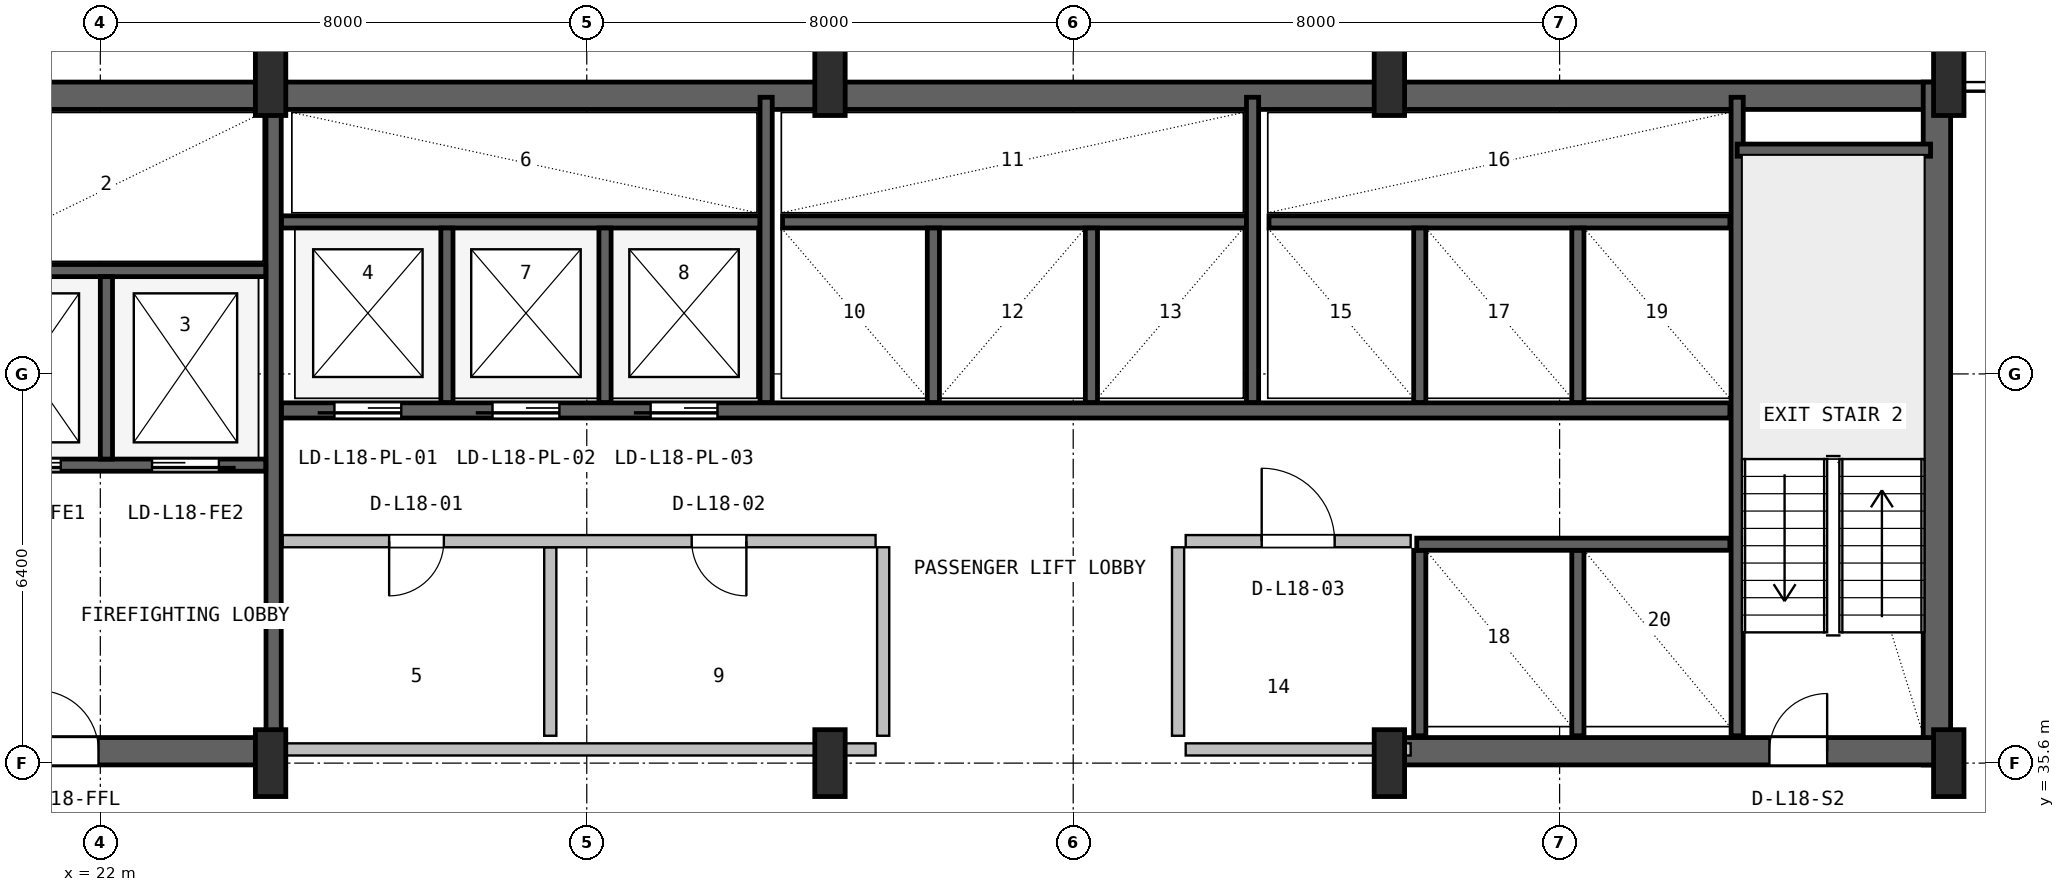
"""IFC4 building model, lengths in metres.
Left out: names, types, materials, properties, quantities, classifications, styles, units other than length and angle.
Written with IfcOpenShell. Run it as: python <this file> out.ifc"""

import sys

from ifc_helpers import new_model, si_unit, direction, frame, frame_2d, origin, origin_2d, place, context, subcontext, project, spatial, rectangle, i_section, extrude, source, transform, mapped, element, fill, save


model = new_model("IFC4")
c1 = context("Model", 3, precision=1e-05, world=origin(), true_north=direction((0.0, 1.0)))
c2 = subcontext(c1, "Body", "Model", "MODEL_VIEW")
j1 = project(units=[si_unit("LENGTHUNIT", "METRE"), si_unit("PLANEANGLEUNIT", "RADIAN")], contexts=[c1])
p1 = place(None, origin())
s1 = spatial("IfcSite", under=j1, at=p1, CompositionType="ELEMENT")
p2 = place(p1, origin())
s2 = spatial("IfcBuilding", under=s1, at=p2, CompositionType="ELEMENT")
p3 = place(p2, frame((0.0, 0.0, 78.3)))
s3 = spatial("IfcBuildingStorey", under=s2, at=p3, CompositionType="ELEMENT", Elevation=78.3)
p4 = place(p3, frame((15.6, 46.575, 0.0), z_axis=(0.0, 0.0, 1.0), x_axis=(1.0, 0.0, 0.0)))
e1 = element("IfcWall", 1, at=p4, inside=s3, PredefinedType="SHEAR", context=c2, shape_type="SweptSolid", body=[
    extrude(rectangle(XDim=36.8, YDim=0.45, at=frame_2d((18.4, 0.0))), origin(), (0.0, 0.0, 1.0), 3.58),
])
p5 = place(p3, frame((52.205, 35.57, 0.0), z_axis=(0.0, 0.0, 1.0), x_axis=(0.0, 1.0, 0.0)))
e2 = element("IfcWall", 2, at=p5, inside=s3, PredefinedType="SHEAR", context=c2, shape_type="SweptSolid", body=[
    extrude(rectangle(XDim=11.23, YDim=0.45, at=frame_2d((5.615, 0.0))), origin(), (0.0, 0.0, 1.0), 3.58),
])
p6 = place(p3, frame((15.57, 35.795, 0.0), z_axis=(0.0, 0.0, 1.0), x_axis=(1.0, 0.0, 0.0)))
e3 = element("IfcWall", 3, at=p6, inside=s3, PredefinedType="SHEAR", context=c2, shape_type="SweptSolid", body=[
    extrude(rectangle(XDim=9.23, YDim=0.45, at=frame_2d((4.615, 0.0))), origin(), (0.0, 0.0, 1.0), 3.58),
])
p7 = place(p6, frame((5.4, 0.0, 0.0)))
e4 = element("IfcOpeningElement", 4, at=p7, cuts=e3, PredefinedType="OPENING", context=c2, shape_type="SweptSolid", body=[
    extrude(rectangle(XDim=1.0, YDim=2.1, at=frame_2d((0.5, 1.05))), frame((0.0, 0.235, 0.0), z_axis=(0.0, -1.0, 0.0), x_axis=(1.0, 0.0, 0.0)), (0.0, 0.0, 1.0), 0.47),
])
p8 = place(p3, frame((43.2, 35.795, 0.0), z_axis=(0.0, 0.0, 1.0), x_axis=(1.0, 0.0, 0.0)))
e5 = element("IfcWall", 5, at=p8, inside=s3, PredefinedType="SHEAR", context=c2, shape_type="SweptSolid", body=[
    extrude(rectangle(XDim=9.23, YDim=0.45, at=frame_2d((4.615, 0.0))), origin(), (0.0, 0.0, 1.0), 3.58),
])
p9 = place(p8, frame((6.25, 0.0, 0.0)))
e6 = element("IfcOpeningElement", 6, at=p9, cuts=e5, PredefinedType="OPENING", context=c2, shape_type="SweptSolid", body=[
    extrude(rectangle(XDim=0.95, YDim=2.1, at=frame_2d((0.475, 1.05))), frame((0.0, 0.235, 0.0), z_axis=(0.0, -1.0, 0.0), x_axis=(1.0, 0.0, 0.0)), (0.0, 0.0, 1.0), 0.47),
])
m1 = source(origin(), c2, "Body", "SweptSolid", [
    extrude(i_section(OverallWidth=0.5, OverallDepth=1.1, WebThickness=0.018, FlangeThickness=0.032, FilletRadius=0.018, at=origin_2d()), origin(), (0.0, 0.0, 1.0), 3.9),
])
for number, where, z_axis, x_axis in (
    (7, (24.8, 35.6, 0.0), (0.0, 0.0, 1.0), (1.0, 0.0, 0.0)),
    (8, (24.8, 46.8, 0.0), (0.0, 0.0, 1.0), (1.0, 0.0, 0.0)),
    (9, (34.0, 35.6, 0.0), (0.0, 0.0, 1.0), (1.0, 0.0, 0.0)),
    (10, (34.0, 46.8, 0.0), (0.0, 0.0, 1.0), (1.0, 0.0, 0.0)),
    (11, (43.2, 35.6, 0.0), (0.0, 0.0, 1.0), (1.0, 0.0, 0.0)),
    (12, (43.2, 46.8, 0.0), (0.0, 0.0, 1.0), (1.0, 0.0, 0.0)),
    (13, (52.4, 35.6, 0.0), (0.0, 0.0, 1.0), (1.0, 0.0, 0.0)),
    (14, (52.4, 46.8, 0.0), (0.0, 0.0, 1.0), (1.0, 0.0, 0.0)),
):
    element("IfcColumn", number, at=place(p3, frame(where, z_axis=z_axis, x_axis=x_axis)), inside=s3, PredefinedType="COLUMN", context=c2, shape_type="MappedRepresentation", body=[
        mapped(m1, transform((0.0, 0.0, 0.0), x_axis=(1.0, 0.0, 0.0), y_axis=(0.0, 1.0, 0.0), z_axis=(0.0, 0.0, 1.0), scale=1.0)),
    ])
p10 = place(p3, frame((24.85, 36.05, 0.0), z_axis=(0.0, 0.0, 1.0), x_axis=(0.0, 1.0, 0.0)))
e15 = element("IfcWall", 15, at=p10, inside=s3, PredefinedType="SHEAR", context=c2, shape_type="SweptSolid", body=[
    extrude(rectangle(XDim=10.45, YDim=0.25, at=frame_2d((5.225, 0.0))), origin(), (0.0, 0.0, 1.0), 3.58),
])
p11 = place(p3, frame((19.2, 40.5, 0.0), z_axis=(0.0, 0.0, 1.0), x_axis=(1.0, 0.0, 0.0)))
e16 = element("IfcWall", 16, at=p11, inside=s3, PredefinedType="SHEAR", context=c2, shape_type="SweptSolid", body=[
    extrude(rectangle(XDim=5.52, YDim=0.2, at=frame_2d((2.76, 0.0))), origin(), (0.0, 0.0, 1.0), 3.58),
])
p12 = place(p11, frame((1.05, 0.0, 0.0)))
e17 = element("IfcOpeningElement", 17, at=p12, cuts=e16, PredefinedType="OPENING", context=c2, shape_type="SweptSolid", body=[
    extrude(rectangle(XDim=1.1, YDim=2.18, at=frame_2d((0.55, 1.09))), frame((0.0, 0.11, 0.0), z_axis=(0.0, -1.0, 0.0), x_axis=(1.0, 0.0, 0.0)), (0.0, 0.0, 1.0), 0.22),
])
p13 = place(p11, frame((3.65, 0.0, 0.0)))
e18 = element("IfcOpeningElement", 18, at=p13, cuts=e16, PredefinedType="OPENING", context=c2, shape_type="SweptSolid", body=[
    extrude(rectangle(XDim=1.1, YDim=2.18, at=frame_2d((0.55, 1.09))), frame((0.0, 0.11, 0.0), z_axis=(0.0, -1.0, 0.0), x_axis=(1.0, 0.0, 0.0)), (0.0, 0.0, 1.0), 0.22),
])
p14 = place(p3, frame((19.2, 43.7, 0.0), z_axis=(0.0, 0.0, 1.0), x_axis=(1.0, 0.0, 0.0)))
e19 = element("IfcWall", 19, at=p14, inside=s3, PredefinedType="SHEAR", context=c2, shape_type="SweptSolid", body=[
    extrude(rectangle(XDim=5.52, YDim=0.2, at=frame_2d((2.76, 0.0))), origin(), (0.0, 0.0, 1.0), 3.58),
])
p15 = place(p3, frame((22.1, 40.6, 0.0), z_axis=(0.0, 0.0, 1.0), x_axis=(0.0, 1.0, 0.0)))
e20 = element("IfcWall", 20, at=p15, inside=s3, PredefinedType="SHEAR", context=c2, shape_type="SweptSolid", body=[
    extrude(rectangle(XDim=3.0, YDim=0.2, at=frame_2d((1.5, 0.0))), origin(), (0.0, 0.0, 1.0), 3.58),
])
p16 = place(p3, frame((48.92, 36.05, 0.0), z_axis=(0.0, 0.0, 1.0), x_axis=(0.0, 1.0, 0.0)))
e21 = element("IfcWall", 21, at=p16, inside=s3, PredefinedType="SHEAR", context=c2, shape_type="SweptSolid", body=[
    extrude(rectangle(XDim=10.5, YDim=0.2, at=frame_2d((5.25, 0.0))), origin(), (0.0, 0.0, 1.0), 3.58),
])
p17 = place(p3, frame((48.92, 45.68, 0.0), z_axis=(0.0, 0.0, 1.0), x_axis=(1.0, 0.0, 0.0)))
e22 = element("IfcWall", 22, at=p17, inside=s3, PredefinedType="SHEAR", context=c2, shape_type="SweptSolid", body=[
    extrude(rectangle(XDim=3.18, YDim=0.2, at=frame_2d((1.59, 0.0))), origin(), (0.0, 0.0, 1.0), 3.58),
])
p18 = place(p3, frame((24.98, 41.4, 0.0), z_axis=(0.0, 0.0, 1.0), x_axis=(1.0, 0.0, 0.0)))
e23 = element("IfcWall", 23, at=p18, inside=s3, PredefinedType="SHEAR", context=c2, shape_type="SweptSolid", body=[
    extrude(rectangle(XDim=23.82, YDim=0.25, at=frame_2d((11.91, 0.0))), origin(), (0.0, 0.0, 1.0), 3.58),
])
p19 = place(p18, frame((0.87, 0.0, 0.0)))
e24 = element("IfcOpeningElement", 24, at=p19, cuts=e23, PredefinedType="OPENING", context=c2, shape_type="SweptSolid", body=[
    extrude(rectangle(XDim=1.1, YDim=2.18, at=frame_2d((0.55, 1.09))), frame((0.0, 0.135, 0.0), z_axis=(0.0, -1.0, 0.0), x_axis=(1.0, 0.0, 0.0)), (0.0, 0.0, 1.0), 0.27),
])
p20 = place(p18, frame((3.47, 0.0, 0.0)))
e25 = element("IfcOpeningElement", 25, at=p20, cuts=e23, PredefinedType="OPENING", context=c2, shape_type="SweptSolid", body=[
    extrude(rectangle(XDim=1.1, YDim=2.18, at=frame_2d((0.55, 1.09))), frame((0.0, 0.135, 0.0), z_axis=(0.0, -1.0, 0.0), x_axis=(1.0, 0.0, 0.0)), (0.0, 0.0, 1.0), 0.27),
])
p21 = place(p18, frame((6.07, 0.0, 0.0)))
e26 = element("IfcOpeningElement", 26, at=p21, cuts=e23, PredefinedType="OPENING", context=c2, shape_type="SweptSolid", body=[
    extrude(rectangle(XDim=1.1, YDim=2.18, at=frame_2d((0.55, 1.09))), frame((0.0, 0.135, 0.0), z_axis=(0.0, -1.0, 0.0), x_axis=(1.0, 0.0, 0.0)), (0.0, 0.0, 1.0), 0.27),
])
p22 = place(p3, frame((24.98, 44.5, 0.0), z_axis=(0.0, 0.0, 1.0), x_axis=(1.0, 0.0, 0.0)))
e27 = element("IfcWall", 27, at=p22, inside=s3, PredefinedType="SHEAR", context=c2, shape_type="SweptSolid", body=[
    extrude(rectangle(XDim=7.87, YDim=0.2, at=frame_2d((3.935, 0.0))), origin(), (0.0, 0.0, 1.0), 3.58),
])
for number, where, z_axis, x_axis in (
    (28, (27.7, 41.53, 0.0), (0.0, 0.0, 1.0), (0.0, 1.0, 0.0)),
    (29, (30.3, 41.53, 0.0), (0.0, 0.0, 1.0), (0.0, 1.0, 0.0)),
):
    element("IfcWall", number, at=place(p3, frame(where, z_axis=z_axis, x_axis=x_axis)), inside=s3, PredefinedType="SHEAR", context=c2, shape_type="SweptSolid", body=[
        extrude(rectangle(XDim=2.87, YDim=0.2, at=frame_2d((1.435, 0.0))), origin(), (0.0, 0.0, 1.0), 3.58),
    ])
p23 = place(p3, frame((32.95, 41.53, 0.0), z_axis=(0.0, 0.0, 1.0), x_axis=(0.0, 1.0, 0.0)))
e30 = element("IfcWall", 30, at=p23, inside=s3, PredefinedType="SHEAR", context=c2, shape_type="SweptSolid", body=[
    extrude(rectangle(XDim=5.02, YDim=0.2, at=frame_2d((2.51, 0.0))), origin(), (0.0, 0.0, 1.0), 3.58),
])
p24 = place(p3, frame((33.22, 44.5, 0.0), z_axis=(0.0, 0.0, 1.0), x_axis=(1.0, 0.0, 0.0)))
e31 = element("IfcWall", 31, at=p24, inside=s3, PredefinedType="SHEAR", context=c2, shape_type="SweptSolid", body=[
    extrude(rectangle(XDim=7.63, YDim=0.2, at=frame_2d((3.815, 0.0))), origin(), (0.0, 0.0, 1.0), 3.58),
])
for number, where, z_axis, x_axis in (
    (32, (35.7, 41.53, 0.0), (0.0, 0.0, 1.0), (0.0, 1.0, 0.0)),
    (33, (38.3, 41.53, 0.0), (0.0, 0.0, 1.0), (0.0, 1.0, 0.0)),
):
    element("IfcWall", number, at=place(p3, frame(where, z_axis=z_axis, x_axis=x_axis)), inside=s3, PredefinedType="SHEAR", context=c2, shape_type="SweptSolid", body=[
        extrude(rectangle(XDim=2.87, YDim=0.2, at=frame_2d((1.435, 0.0))), origin(), (0.0, 0.0, 1.0), 3.58),
    ])
p25 = place(p3, frame((40.95, 41.53, 0.0), z_axis=(0.0, 0.0, 1.0), x_axis=(0.0, 1.0, 0.0)))
e34 = element("IfcWall", 34, at=p25, inside=s3, PredefinedType="SHEAR", context=c2, shape_type="SweptSolid", body=[
    extrude(rectangle(XDim=5.02, YDim=0.2, at=frame_2d((2.51, 0.0))), origin(), (0.0, 0.0, 1.0), 3.58),
])
p26 = place(p3, frame((41.22, 44.5, 0.0), z_axis=(0.0, 0.0, 1.0), x_axis=(1.0, 0.0, 0.0)))
e35 = element("IfcWall", 35, at=p26, inside=s3, PredefinedType="SHEAR", context=c2, shape_type="SweptSolid", body=[
    extrude(rectangle(XDim=7.58, YDim=0.2, at=frame_2d((3.79, 0.0))), origin(), (0.0, 0.0, 1.0), 3.58),
])
for number, where, z_axis, x_axis in (
    (36, (43.7, 41.53, 0.0), (0.0, 0.0, 1.0), (0.0, 1.0, 0.0)),
    (37, (46.3, 41.53, 0.0), (0.0, 0.0, 1.0), (0.0, 1.0, 0.0)),
):
    element("IfcWall", number, at=place(p3, frame(where, z_axis=z_axis, x_axis=x_axis)), inside=s3, PredefinedType="SHEAR", context=c2, shape_type="SweptSolid", body=[
        extrude(rectangle(XDim=2.87, YDim=0.2, at=frame_2d((1.435, 0.0))), origin(), (0.0, 0.0, 1.0), 3.58),
    ])
for number, where, z_axis, x_axis in (
    (38, (43.7, 36.05, 0.0), (0.0, 0.0, 1.0), (0.0, 1.0, 0.0)),
    (39, (46.3, 36.05, 0.0), (0.0, 0.0, 1.0), (0.0, 1.0, 0.0)),
):
    element("IfcWall", number, at=place(p3, frame(where, z_axis=z_axis, x_axis=x_axis)), inside=s3, PredefinedType="SHEAR", context=c2, shape_type="SweptSolid", body=[
        extrude(rectangle(XDim=3.05, YDim=0.2, at=frame_2d((1.525, 0.0))), origin(), (0.0, 0.0, 1.0), 3.58),
    ])
p27 = place(p3, frame((43.65, 39.2, 0.0), z_axis=(0.0, 0.0, 1.0), x_axis=(1.0, 0.0, 0.0)))
e40 = element("IfcWall", 40, at=p27, inside=s3, PredefinedType="SHEAR", context=c2, shape_type="SweptSolid", body=[
    extrude(rectangle(XDim=5.15, YDim=0.2, at=frame_2d((2.575, 0.0))), origin(), (0.0, 0.0, 1.0), 3.58),
])
p28 = place(p3, frame((25.0, 35.825, 0.0), z_axis=(0.0, 0.0, 1.0), x_axis=(1.0, 0.0, 0.0)))
e41 = element("IfcWall", 41, at=p28, inside=s3, PredefinedType="PLUMBINGWALL", context=c2, shape_type="SweptSolid", body=[
    extrude(rectangle(XDim=9.75, YDim=0.2, at=frame_2d((4.875, 0.0))), origin(), (0.0, 0.0, 1.0), 2.355),
])
p29 = place(p3, frame((29.4, 36.05, 0.0), z_axis=(0.0, 0.0, 1.0), x_axis=(0.0, 1.0, 0.0)))
e42 = element("IfcWall", 42, at=p29, inside=s3, PredefinedType="PLUMBINGWALL", context=c2, shape_type="SweptSolid", body=[
    extrude(rectangle(XDim=3.1, YDim=0.2, at=frame_2d((1.55, 0.0))), origin(), (0.0, 0.0, 1.0), 3.56),
])
p30 = place(p3, frame((25.0, 39.25, 0.0), z_axis=(0.0, 0.0, 1.0), x_axis=(1.0, 0.0, 0.0)))
e43 = element("IfcWall", 43, at=p30, inside=s3, PredefinedType="PLUMBINGWALL", context=c2, shape_type="SweptSolid", body=[
    extrude(rectangle(XDim=9.75, YDim=0.2, at=frame_2d((4.875, 0.0))), origin(), (0.0, 0.0, 1.0), 3.56),
])
p31 = place(p30, frame((1.75, 0.0, 0.0)))
e44 = element("IfcOpeningElement", 44, at=p31, cuts=e43, PredefinedType="OPENING", context=c2, shape_type="SweptSolid", body=[
    extrude(rectangle(XDim=0.9, YDim=2.06, at=frame_2d((0.45, 1.03))), frame((0.0, 0.11, 0.0), z_axis=(0.0, -1.0, 0.0), x_axis=(1.0, 0.0, 0.0)), (0.0, 0.0, 1.0), 0.22),
])
p32 = place(p30, frame((6.725, 0.0, 0.0)))
e45 = element("IfcOpeningElement", 45, at=p32, cuts=e43, PredefinedType="OPENING", context=c2, shape_type="SweptSolid", body=[
    extrude(rectangle(XDim=0.9, YDim=2.06, at=frame_2d((0.45, 1.03))), frame((0.0, 0.11, 0.0), z_axis=(0.0, -1.0, 0.0), x_axis=(1.0, 0.0, 0.0)), (0.0, 0.0, 1.0), 0.22),
])
p33 = place(p3, frame((34.875, 36.05, 0.0), z_axis=(0.0, 0.0, 1.0), x_axis=(0.0, 1.0, 0.0)))
e46 = element("IfcWall", 46, at=p33, inside=s3, PredefinedType="PLUMBINGWALL", context=c2, shape_type="SweptSolid", body=[
    extrude(rectangle(XDim=3.1, YDim=0.2, at=frame_2d((1.55, 0.0))), origin(), (0.0, 0.0, 1.0), 3.56),
])
p34 = place(p3, frame((39.85, 35.825, 0.0), z_axis=(0.0, 0.0, 1.0), x_axis=(1.0, 0.0, 0.0)))
e47 = element("IfcWall", 47, at=p34, inside=s3, PredefinedType="SOLIDWALL", context=c2, shape_type="SweptSolid", body=[
    extrude(rectangle(XDim=3.7, YDim=0.2, at=frame_2d((1.85, 0.0))), origin(), (0.0, 0.0, 1.0), 2.355),
])
p35 = place(p3, frame((39.85, 39.25, 0.0), z_axis=(0.0, 0.0, 1.0), x_axis=(1.0, 0.0, 0.0)))
e48 = element("IfcWall", 48, at=p35, inside=s3, PredefinedType="SOLIDWALL", context=c2, shape_type="SweptSolid", body=[
    extrude(rectangle(XDim=3.7, YDim=0.2, at=frame_2d((1.85, 0.0))), origin(), (0.0, 0.0, 1.0), 3.56),
])
p36 = place(p35, frame((1.25, 0.0, 0.0)))
e49 = element("IfcOpeningElement", 49, at=p36, cuts=e48, PredefinedType="OPENING", context=c2, shape_type="SweptSolid", body=[
    extrude(rectangle(XDim=1.2, YDim=2.1, at=frame_2d((0.6, 1.05))), frame((0.0, 0.11, 0.0), z_axis=(0.0, -1.0, 0.0), x_axis=(1.0, 0.0, 0.0)), (0.0, 0.0, 1.0), 0.22),
])
p37 = place(p3, frame((39.725, 36.05, 0.0), z_axis=(0.0, 0.0, 1.0), x_axis=(0.0, 1.0, 0.0)))
e50 = element("IfcWall", 50, at=p37, inside=s3, PredefinedType="SOLIDWALL", context=c2, shape_type="SweptSolid", body=[
    extrude(rectangle(XDim=3.1, YDim=0.2, at=frame_2d((1.55, 0.0))), origin(), (0.0, 0.0, 1.0), 3.56),
])
m2 = source(origin(), c2, "Body", "SweptSolid", [
    extrude(rectangle(XDim=1.0, YDim=2.1, at=frame_2d((0.5, 1.05))), frame((0.0, 0.025, 0.0), z_axis=(0.0, -1.0, 0.0), x_axis=(1.0, 0.0, 0.0)), (0.0, 0.0, 1.0), 0.05),
])
p38 = place(p7, origin())
e51 = element("IfcDoor", 51, at=p38, inside=s3, OperationType="SINGLE_SWING_LEFT", PredefinedType="DOOR", context=c2, shape_type="MappedRepresentation", body=[
    mapped(m2, transform((0.0, 0.0, 0.0), x_axis=(1.0, 0.0, 0.0), y_axis=(0.0, 1.0, 0.0), z_axis=(0.0, 0.0, 1.0), scale=1.0)),
])
fill(e4, e51)
m3 = source(origin(), c2, "Body", "SweptSolid", [
    extrude(rectangle(XDim=1.1, YDim=2.18, at=frame_2d((0.55, 1.09))), frame((0.0, 0.025, 0.0), z_axis=(0.0, -1.0, 0.0), x_axis=(1.0, 0.0, 0.0)), (0.0, 0.0, 1.0), 0.05),
])
p39 = place(p12, frame((1.1, 0.0, 0.0), z_axis=(0.0, 0.0, 1.0), x_axis=(-1.0, 0.0, 0.0)))
e52 = element("IfcDoor", 52, at=p39, inside=s3, OperationType="SLIDING_TO_LEFT", PredefinedType="DOOR", context=c2, shape_type="MappedRepresentation", body=[
    mapped(m3, transform((0.0, 0.0, 0.0), x_axis=(1.0, 0.0, 0.0), y_axis=(0.0, 1.0, 0.0), z_axis=(0.0, 0.0, 1.0), scale=1.0)),
])
fill(e17, e52)
p40 = place(p13, frame((1.1, 0.0, 0.0), z_axis=(0.0, 0.0, 1.0), x_axis=(-1.0, 0.0, 0.0)))
e53 = element("IfcDoor", 53, at=p40, inside=s3, OperationType="SLIDING_TO_RIGHT", PredefinedType="DOOR", context=c2, shape_type="MappedRepresentation", body=[
    mapped(m3, transform((0.0, 0.0, 0.0), x_axis=(1.0, 0.0, 0.0), y_axis=(0.0, 1.0, 0.0), z_axis=(0.0, 0.0, 1.0), scale=1.0)),
])
fill(e18, e53)
m4 = source(origin(), c2, "Body", "SweptSolid", [
    extrude(rectangle(XDim=0.95, YDim=2.1, at=frame_2d((0.475, 1.05))), frame((0.0, 0.025, 0.0), z_axis=(0.0, -1.0, 0.0), x_axis=(1.0, 0.0, 0.0)), (0.0, 0.0, 1.0), 0.05),
])
p41 = place(p9, origin())
e54 = element("IfcDoor", 54, at=p41, inside=s3, OperationType="SINGLE_SWING_RIGHT", PredefinedType="DOOR", context=c2, shape_type="MappedRepresentation", body=[
    mapped(m4, transform((0.0, 0.0, 0.0), x_axis=(1.0, 0.0, 0.0), y_axis=(0.0, 1.0, 0.0), z_axis=(0.0, 0.0, 1.0), scale=1.0)),
])
fill(e6, e54)
p42 = place(p19, frame((1.1, 0.0, 0.0), z_axis=(0.0, 0.0, 1.0), x_axis=(-1.0, 0.0, 0.0)))
e55 = element("IfcDoor", 55, at=p42, inside=s3, OperationType="SLIDING_TO_LEFT", PredefinedType="DOOR", context=c2, shape_type="MappedRepresentation", body=[
    mapped(m3, transform((0.0, 0.0, 0.0), x_axis=(1.0, 0.0, 0.0), y_axis=(0.0, 1.0, 0.0), z_axis=(0.0, 0.0, 1.0), scale=1.0)),
])
fill(e24, e55)
p43 = place(p20, frame((1.1, 0.0, 0.0), z_axis=(0.0, 0.0, 1.0), x_axis=(-1.0, 0.0, 0.0)))
e56 = element("IfcDoor", 56, at=p43, inside=s3, OperationType="SLIDING_TO_LEFT", PredefinedType="DOOR", context=c2, shape_type="MappedRepresentation", body=[
    mapped(m3, transform((0.0, 0.0, 0.0), x_axis=(1.0, 0.0, 0.0), y_axis=(0.0, 1.0, 0.0), z_axis=(0.0, 0.0, 1.0), scale=1.0)),
])
fill(e25, e56)
p44 = place(p21, frame((1.1, 0.0, 0.0), z_axis=(0.0, 0.0, 1.0), x_axis=(-1.0, 0.0, 0.0)))
e57 = element("IfcDoor", 57, at=p44, inside=s3, OperationType="SLIDING_TO_LEFT", PredefinedType="DOOR", context=c2, shape_type="MappedRepresentation", body=[
    mapped(m3, transform((0.0, 0.0, 0.0), x_axis=(1.0, 0.0, 0.0), y_axis=(0.0, 1.0, 0.0), z_axis=(0.0, 0.0, 1.0), scale=1.0)),
])
fill(e26, e57)
m5 = source(origin(), c2, "Body", "SweptSolid", [
    extrude(rectangle(XDim=0.9, YDim=2.06, at=frame_2d((0.45, 1.03))), frame((0.0, 0.025, 0.0), z_axis=(0.0, -1.0, 0.0), x_axis=(1.0, 0.0, 0.0)), (0.0, 0.0, 1.0), 0.05),
])
p45 = place(p31, frame((0.9, 0.0, 0.0), z_axis=(0.0, 0.0, 1.0), x_axis=(-1.0, 0.0, 0.0)))
e58 = element("IfcDoor", 58, at=p45, inside=s3, OperationType="SINGLE_SWING_LEFT", PredefinedType="DOOR", context=c2, shape_type="MappedRepresentation", body=[
    mapped(m5, transform((0.0, 0.0, 0.0), x_axis=(1.0, 0.0, 0.0), y_axis=(0.0, 1.0, 0.0), z_axis=(0.0, 0.0, 1.0), scale=1.0)),
])
fill(e44, e58)
p46 = place(p32, frame((0.9, 0.0, 0.0), z_axis=(0.0, 0.0, 1.0), x_axis=(-1.0, 0.0, 0.0)))
e59 = element("IfcDoor", 59, at=p46, inside=s3, OperationType="SINGLE_SWING_RIGHT", PredefinedType="DOOR", context=c2, shape_type="MappedRepresentation", body=[
    mapped(m5, transform((0.0, 0.0, 0.0), x_axis=(1.0, 0.0, 0.0), y_axis=(0.0, 1.0, 0.0), z_axis=(0.0, 0.0, 1.0), scale=1.0)),
])
fill(e45, e59)
m6 = source(origin(), c2, "Body", "SweptSolid", [
    extrude(rectangle(XDim=1.2, YDim=2.1, at=frame_2d((0.6, 1.05))), frame((0.0, 0.025, 0.0), z_axis=(0.0, -1.0, 0.0), x_axis=(1.0, 0.0, 0.0)), (0.0, 0.0, 1.0), 0.05),
])
p47 = place(p36, origin())
e60 = element("IfcDoor", 60, at=p47, inside=s3, OperationType="SINGLE_SWING_LEFT", PredefinedType="DOOR", context=c2, shape_type="MappedRepresentation", body=[
    mapped(m6, transform((0.0, 0.0, 0.0), x_axis=(1.0, 0.0, 0.0), y_axis=(0.0, 1.0, 0.0), z_axis=(0.0, 0.0, 1.0), scale=1.0)),
])
fill(e49, e60)
save(model, sys.argv[1])
